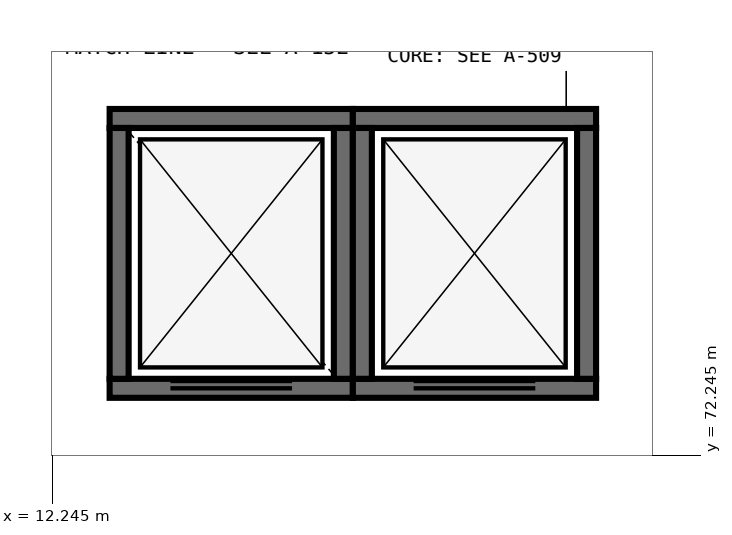
"""IFC4 building model, lengths in metres.
Left out: names, types, materials, properties, quantities, classifications, styles, units other than length and angle.
Written with IfcOpenShell. Run it as: python <this file> out.ifc"""

import sys

from ifc_helpers import new_model, si_unit, direction, frame, frame_2d, origin, place, context, subcontext, project, spatial, rectangle, extrude, element, fill, save


model = new_model("IFC4")
c1 = context("Model", 3, precision=1e-05, world=origin(), true_north=direction((0.0, 1.0)))
c2 = subcontext(c1, "Body", "Model", "MODEL_VIEW")
j1 = project(units=[si_unit("LENGTHUNIT", "METRE"), si_unit("PLANEANGLEUNIT", "RADIAN")], contexts=[c1])
p1 = place(None, origin())
s1 = spatial("IfcSite", under=j1, at=p1, CompositionType="ELEMENT")
p2 = place(p1, origin())
s2 = spatial("IfcBuilding", under=s1, at=p2, CompositionType="ELEMENT")
p3 = place(p2, frame((0.0, 0.0, 23.4)))
s3 = spatial("IfcBuildingStorey", under=s2, at=p3, CompositionType="ELEMENT", Elevation=23.4)
p4 = place(p3, frame((13.0, 73.125, 0.0), z_axis=(0.0, 0.0, 1.0), x_axis=(1.0, 0.0, 0.0)))
e1 = element("IfcWall", 1, at=p4, inside=s3, PredefinedType="SHEAR", context=c2, shape_type="SweptSolid", body=[
    extrude(rectangle(XDim=3.2, YDim=0.25, at=frame_2d((1.6, 0.0))), origin(), (0.0, 0.0, 1.0), 3.85),
])
p5 = place(p4, frame((0.8, 0.0, 0.0)))
e2 = element("IfcOpeningElement", 2, at=p5, cuts=e1, PredefinedType="OPENING", context=c2, shape_type="SweptSolid", body=[
    extrude(rectangle(XDim=1.6, YDim=2.4, at=frame_2d((0.8, 1.2))), frame((0.0, 0.14, 0.0), z_axis=(0.0, -1.0, 0.0), x_axis=(1.0, 0.0, 0.0)), (0.0, 0.0, 1.0), 0.28),
])
p6 = place(p3, frame((16.2, 76.675, 0.0), z_axis=(0.0, 0.0, 1.0), x_axis=(-1.0, 0.0, 0.0)))
e3 = element("IfcWall", 3, at=p6, inside=s3, PredefinedType="SHEAR", context=c2, shape_type="SweptSolid", body=[
    extrude(rectangle(XDim=3.2, YDim=0.25, at=frame_2d((1.6, 0.0))), origin(), (0.0, 0.0, 1.0), 3.85),
])
for number, where, z_axis, x_axis in (
    (4, (13.125, 76.55, 0.0), (0.0, 0.0, 1.0), (0.0, -1.0, 0.0)),
    (5, (16.075, 73.25, 0.0), (0.0, 0.0, 1.0), (0.0, 1.0, 0.0)),
):
    element("IfcWall", number, at=place(p3, frame(where, z_axis=z_axis, x_axis=x_axis)), inside=s3, PredefinedType="SHEAR", context=c2, shape_type="SweptSolid", body=[
        extrude(rectangle(XDim=3.3, YDim=0.25, at=frame_2d((1.65, 0.0))), origin(), (0.0, 0.0, 1.0), 3.85),
    ])
p7 = place(p3, frame((16.2, 73.125, 0.0), z_axis=(0.0, 0.0, 1.0), x_axis=(1.0, 0.0, 0.0)))
e6 = element("IfcWall", 6, at=p7, inside=s3, PredefinedType="SHEAR", context=c2, shape_type="SweptSolid", body=[
    extrude(rectangle(XDim=3.2, YDim=0.25, at=frame_2d((1.6, 0.0))), origin(), (0.0, 0.0, 1.0), 3.85),
])
p8 = place(p7, frame((0.8, 0.0, 0.0)))
e7 = element("IfcOpeningElement", 7, at=p8, cuts=e6, PredefinedType="OPENING", context=c2, shape_type="SweptSolid", body=[
    extrude(rectangle(XDim=1.6, YDim=2.4, at=frame_2d((0.8, 1.2))), frame((0.0, 0.14, 0.0), z_axis=(0.0, -1.0, 0.0), x_axis=(1.0, 0.0, 0.0)), (0.0, 0.0, 1.0), 0.28),
])
p9 = place(p3, frame((19.4, 76.675, 0.0), z_axis=(0.0, 0.0, 1.0), x_axis=(-1.0, 0.0, 0.0)))
e8 = element("IfcWall", 8, at=p9, inside=s3, PredefinedType="SHEAR", context=c2, shape_type="SweptSolid", body=[
    extrude(rectangle(XDim=3.2, YDim=0.25, at=frame_2d((1.6, 0.0))), origin(), (0.0, 0.0, 1.0), 3.85),
])
for number, where, z_axis, x_axis in (
    (9, (16.325, 76.55, 0.0), (0.0, 0.0, 1.0), (0.0, -1.0, 0.0)),
    (10, (19.275, 73.25, 0.0), (0.0, 0.0, 1.0), (0.0, 1.0, 0.0)),
):
    element("IfcWall", number, at=place(p3, frame(where, z_axis=z_axis, x_axis=x_axis)), inside=s3, PredefinedType="SHEAR", context=c2, shape_type="SweptSolid", body=[
        extrude(rectangle(XDim=3.3, YDim=0.25, at=frame_2d((1.65, 0.0))), origin(), (0.0, 0.0, 1.0), 3.85),
    ])
p10 = place(p5, origin())
e11 = element("IfcDoor", 11, at=p10, inside=s3, OperationType="DOUBLE_DOOR_SLIDING", PredefinedType="DOOR", context=c2, shape_type="SweptSolid", body=[
    extrude(rectangle(XDim=1.6, YDim=2.4, at=frame_2d((0.8, 1.2))), frame((0.0, 0.025, 0.0), z_axis=(0.0, -1.0, 0.0), x_axis=(1.0, 0.0, 0.0)), (0.0, 0.0, 1.0), 0.05),
])
fill(e2, e11)
p11 = place(p8, origin())
e12 = element("IfcDoor", 12, at=p11, inside=s3, OperationType="DOUBLE_DOOR_SLIDING", PredefinedType="DOOR", context=c2, shape_type="SweptSolid", body=[
    extrude(rectangle(XDim=1.6, YDim=2.4, at=frame_2d((0.8, 1.2))), frame((0.0, 0.025, 0.0), z_axis=(0.0, -1.0, 0.0), x_axis=(1.0, 0.0, 0.0)), (0.0, 0.0, 1.0), 0.05),
])
fill(e7, e12)
save(model, sys.argv[1])
